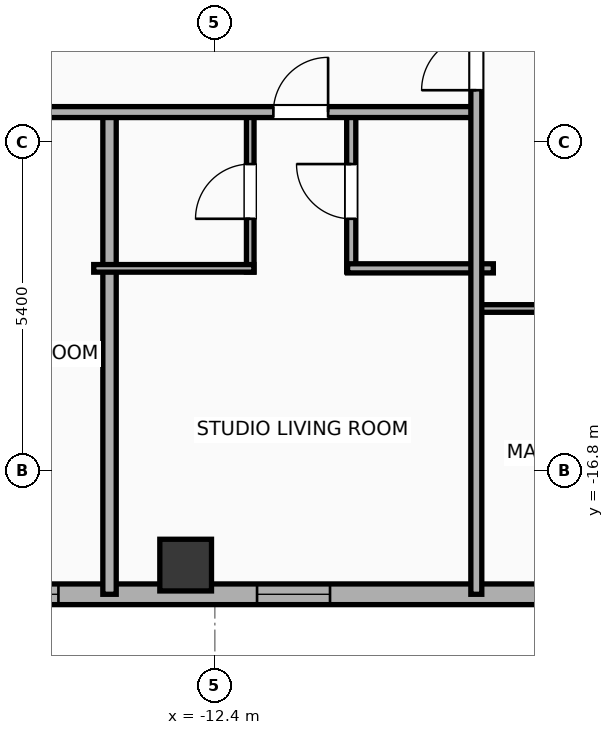
"""IFC4 building model, lengths in metres.
Left out: names, types, materials, properties, quantities, classifications, styles, units other than length and angle.
Written with IfcOpenShell. Run it as: python <this file> out.ifc"""

import sys

from ifc_helpers import new_model, si_unit, direction, frame, frame_2d, origin, origin_2d, place, context, subcontext, project, spatial, rectangle, hollow_rectangle, extrude, element, fill, save


model = new_model("IFC4")
c1 = context("Model", 3, precision=1e-05, world=origin(), true_north=direction((0.0, 1.0)))
c2 = subcontext(c1, "Body", "Model", "MODEL_VIEW")
j1 = project(units=[si_unit("LENGTHUNIT", "METRE"), si_unit("PLANEANGLEUNIT", "RADIAN")], contexts=[c1])
p1 = place(None, origin())
s1 = spatial("IfcSite", under=j1, at=p1, CompositionType="ELEMENT")
p2 = place(p1, origin())
s2 = spatial("IfcBuilding", under=s1, at=p2, CompositionType="ELEMENT")
p3 = place(p2, frame((0.0, 0.0, 243.1)))
s3 = spatial("IfcBuildingStorey", under=s2, at=p3, CompositionType="ELEMENT", Elevation=243.1)
p4 = place(p3, frame((-12.88, -18.35, 0.0), z_axis=(0.0, 0.0, 1.0), x_axis=(1.0, 0.0, 0.0)))
e1 = element("IfcColumn", 1, at=p4, inside=s3, PredefinedType="COLUMN", context=c2, shape_type="SweptSolid", body=[
    extrude(hollow_rectangle(XDim=0.85, YDim=0.85, WallThickness=0.028, at=origin_2d()), origin(), (0.0, 0.0, 1.0), 3.9),
])
p5 = place(p3, frame((26.783, -18.83, 0.0), z_axis=(0.0, 0.0, 1.0), x_axis=(-1.0, 0.0, 0.0)))
e2 = element("IfcWall", 2, at=p5, inside=s3, PredefinedType="ELEMENTEDWALL", context=c2, shape_type="SweptSolid", body=[
    extrude(rectangle(XDim=49.566, YDim=0.34, at=frame_2d((24.783, 0.0))), origin(), (0.0, 0.0, 1.0), 3.65),
])
p6 = place(p5, frame((23.583, 0.0, 0.75)))
e3 = element("IfcOpeningElement", 3, at=p6, cuts=e2, PredefinedType="OPENING", context=c2, shape_type="SweptSolid", body=[
    extrude(rectangle(XDim=2.4, YDim=2.1, at=frame_2d((1.2, 1.05))), frame((0.0, 0.18, 0.0), z_axis=(0.0, -1.0, 0.0), x_axis=(1.0, 0.0, 0.0)), (0.0, 0.0, 1.0), 0.36),
])
p7 = place(p5, frame((41.756, 0.0, 0.75)))
e4 = element("IfcOpeningElement", 4, at=p7, cuts=e2, PredefinedType="OPENING", context=c2, shape_type="SweptSolid", body=[
    extrude(rectangle(XDim=2.4, YDim=2.1, at=frame_2d((1.2, 1.05))), frame((0.0, 0.18, 0.0), z_axis=(0.0, -1.0, 0.0), x_axis=(1.0, 0.0, 0.0)), (0.0, 0.0, 1.0), 0.36),
])
p8 = place(p5, frame((47.222, 0.0, 0.75)))
e5 = element("IfcOpeningElement", 5, at=p8, cuts=e2, PredefinedType="OPENING", context=c2, shape_type="SweptSolid", body=[
    extrude(rectangle(XDim=1.2, YDim=2.05, at=frame_2d((0.6, 1.025))), frame((0.0, 0.18, 0.0), z_axis=(0.0, -1.0, 0.0), x_axis=(1.0, 0.0, 0.0)), (0.0, 0.0, 1.0), 0.36),
])
p9 = place(p5, frame((45.263, 0.0, 0.75)))
e6 = element("IfcOpeningElement", 6, at=p9, cuts=e2, PredefinedType="OPENING", context=c2, shape_type="SweptSolid", body=[
    extrude(rectangle(XDim=1.2, YDim=2.05, at=frame_2d((0.6, 1.025))), frame((0.0, 0.18, 0.0), z_axis=(0.0, -1.0, 0.0), x_axis=(1.0, 0.0, 0.0)), (0.0, 0.0, 1.0), 0.36),
])
p10 = place(p5, frame((37.289, 0.0, 0.75)))
e7 = element("IfcOpeningElement", 7, at=p10, cuts=e2, PredefinedType="OPENING", context=c2, shape_type="SweptSolid", body=[
    extrude(rectangle(XDim=1.2, YDim=2.05, at=frame_2d((0.6, 1.025))), frame((0.0, 0.18, 0.0), z_axis=(0.0, -1.0, 0.0), x_axis=(1.0, 0.0, 0.0)), (0.0, 0.0, 1.0), 0.36),
])
p11 = place(p5, frame((16.115, 0.0, 0.75)))
e8 = element("IfcOpeningElement", 8, at=p11, cuts=e2, PredefinedType="OPENING", context=c2, shape_type="SweptSolid", body=[
    extrude(rectangle(XDim=1.2, YDim=2.05, at=frame_2d((0.6, 1.025))), frame((0.0, 0.18, 0.0), z_axis=(0.0, -1.0, 0.0), x_axis=(1.0, 0.0, 0.0)), (0.0, 0.0, 1.0), 0.36),
])
p12 = place(p5, frame((12.422, 0.0, 0.75)))
e9 = element("IfcOpeningElement", 9, at=p12, cuts=e2, PredefinedType="OPENING", context=c2, shape_type="SweptSolid", body=[
    extrude(rectangle(XDim=1.2, YDim=2.05, at=frame_2d((0.6, 1.025))), frame((0.0, 0.18, 0.0), z_axis=(0.0, -1.0, 0.0), x_axis=(1.0, 0.0, 0.0)), (0.0, 0.0, 1.0), 0.36),
])
p13 = place(p5, frame((8.01, 0.0, 0.75)))
e10 = element("IfcOpeningElement", 10, at=p13, cuts=e2, PredefinedType="OPENING", context=c2, shape_type="SweptSolid", body=[
    extrude(rectangle(XDim=1.2, YDim=2.05, at=frame_2d((0.6, 1.025))), frame((0.0, 0.18, 0.0), z_axis=(0.0, -1.0, 0.0), x_axis=(1.0, 0.0, 0.0)), (0.0, 0.0, 1.0), 0.36),
])
p14 = place(p5, frame((5.037, 0.0, 0.75)))
e11 = element("IfcOpeningElement", 11, at=p14, cuts=e2, PredefinedType="OPENING", context=c2, shape_type="SweptSolid", body=[
    extrude(rectangle(XDim=1.2, YDim=2.05, at=frame_2d((0.6, 1.025))), frame((0.0, 0.18, 0.0), z_axis=(0.0, -1.0, 0.0), x_axis=(1.0, 0.0, 0.0)), (0.0, 0.0, 1.0), 0.36),
])
p15 = place(p5, frame((1.811, 0.0, 0.75)))
e12 = element("IfcOpeningElement", 12, at=p15, cuts=e2, PredefinedType="OPENING", context=c2, shape_type="SweptSolid", body=[
    extrude(rectangle(XDim=1.2, YDim=2.05, at=frame_2d((0.6, 1.025))), frame((0.0, 0.18, 0.0), z_axis=(0.0, -1.0, 0.0), x_axis=(1.0, 0.0, 0.0)), (0.0, 0.0, 1.0), 0.36),
])
p16 = place(p5, frame((32.253, 0.0, 0.75)))
e13 = element("IfcOpeningElement", 13, at=p16, cuts=e2, PredefinedType="OPENING", context=c2, shape_type="SweptSolid", body=[
    extrude(rectangle(XDim=1.2, YDim=2.05, at=frame_2d((0.6, 1.025))), frame((0.0, 0.18, 0.0), z_axis=(0.0, -1.0, 0.0), x_axis=(1.0, 0.0, 0.0)), (0.0, 0.0, 1.0), 0.36),
])
p17 = place(p5, frame((27.853, 0.0, 0.75)))
e14 = element("IfcOpeningElement", 14, at=p17, cuts=e2, PredefinedType="OPENING", context=c2, shape_type="SweptSolid", body=[
    extrude(rectangle(XDim=1.2, YDim=2.05, at=frame_2d((0.6, 1.025))), frame((0.0, 0.18, 0.0), z_axis=(0.0, -1.0, 0.0), x_axis=(1.0, 0.0, 0.0)), (0.0, 0.0, 1.0), 0.36),
])
p18 = place(p5, frame((20.473, 0.0, 0.75)))
e15 = element("IfcOpeningElement", 15, at=p18, cuts=e2, PredefinedType="OPENING", context=c2, shape_type="SweptSolid", body=[
    extrude(rectangle(XDim=1.2, YDim=2.05, at=frame_2d((0.6, 1.025))), frame((0.0, 0.18, 0.0), z_axis=(0.0, -1.0, 0.0), x_axis=(1.0, 0.0, 0.0)), (0.0, 0.0, 1.0), 0.36),
])
p19 = place(p3, frame((-14.132, -18.83, 0.0), z_axis=(0.0, 0.0, 1.0), x_axis=(0.0, 1.0, 0.0)))
e16 = element("IfcWall", 16, at=p19, inside=s3, PredefinedType="PARTITIONING", context=c2, shape_type="SweptSolid", body=[
    extrude(rectangle(XDim=8.01, YDim=0.22, at=frame_2d((4.005, 0.0))), origin(), (0.0, 0.0, 1.0), 3.65),
])
p20 = place(p3, frame((-11.818, -13.53, 0.0), z_axis=(0.0, 0.0, 1.0), x_axis=(0.0, 1.0, 0.0)))
e17 = element("IfcWall", 17, at=p20, inside=s3, PredefinedType="PARTITIONING", context=c2, shape_type="SweptSolid", body=[
    extrude(rectangle(XDim=2.65, YDim=0.125, at=frame_2d((1.325, 0.0))), origin(), (0.0, 0.0, 1.0), 3.65),
])
p21 = place(p20, frame((0.875, 0.0, 0.0)))
e18 = element("IfcOpeningElement", 18, at=p21, cuts=e17, PredefinedType="OPENING", context=c2, shape_type="SweptSolid", body=[
    extrude(rectangle(XDim=0.9, YDim=2.05, at=frame_2d((0.45, 1.025))), frame((0.0, 0.073, 0.0), z_axis=(0.0, -1.0, 0.0), x_axis=(1.0, 0.0, 0.0)), (0.0, 0.0, 1.0), 0.145),
])
p22 = place(p3, frame((-10.157, -13.53, 0.0), z_axis=(0.0, 0.0, 1.0), x_axis=(0.0, 1.0, 0.0)))
e19 = element("IfcWall", 19, at=p22, inside=s3, PredefinedType="PLUMBINGWALL", context=c2, shape_type="SweptSolid", body=[
    extrude(rectangle(XDim=2.65, YDim=0.15, at=frame_2d((1.325, 0.0))), origin(), (0.0, 0.0, 1.0), 3.65),
])
p23 = place(p22, frame((0.875, 0.0, 0.0)))
e20 = element("IfcOpeningElement", 20, at=p23, cuts=e19, PredefinedType="OPENING", context=c2, shape_type="SweptSolid", body=[
    extrude(rectangle(XDim=0.9, YDim=2.05, at=frame_2d((0.45, 1.025))), frame((0.0, 0.085, 0.0), z_axis=(0.0, -1.0, 0.0), x_axis=(1.0, 0.0, 0.0)), (0.0, 0.0, 1.0), 0.17),
])
p24 = place(p3, frame((-14.392, -13.47, 0.0), z_axis=(0.0, 0.0, 1.0), x_axis=(1.0, 0.0, 0.0)))
e21 = element("IfcWall", 21, at=p24, inside=s3, PredefinedType="PARTITIONING", context=c2, shape_type="SweptSolid", body=[
    extrude(rectangle(XDim=2.634, YDim=0.125, at=frame_2d((1.317, 0.0))), origin(), (0.0, 0.0, 1.0), 3.65),
])
p25 = place(p3, frame((-10.217, -13.47, 0.0), z_axis=(0.0, 0.0, 1.0), x_axis=(1.0, 0.0, 0.0)))
e22 = element("IfcWall", 22, at=p25, inside=s3, PredefinedType="PLUMBINGWALL", context=c2, shape_type="SweptSolid", body=[
    extrude(rectangle(XDim=2.397, YDim=0.15, at=frame_2d((1.198, 0.0))), origin(), (0.0, 0.0, 1.0), 3.65),
])
p26 = place(p3, frame((-26.23, -10.9, 0.0), z_axis=(0.0, 0.0, 1.0), x_axis=(1.0, 0.0, 0.0)))
e23 = element("IfcWall", 23, at=p26, inside=s3, PredefinedType="PARTITIONING", context=c2, shape_type="SweptSolid", body=[
    extrude(rectangle(XDim=18.15, YDim=0.18, at=frame_2d((9.075, 0.0))), origin(), (0.0, 0.0, 1.0), 3.65),
])
p27 = place(p26, frame((2.659, 0.0, 0.0)))
e24 = element("IfcOpeningElement", 24, at=p27, cuts=e23, PredefinedType="OPENING", context=c2, shape_type="SweptSolid", body=[
    extrude(rectangle(XDim=0.9, YDim=2.05, at=frame_2d((0.45, 1.025))), frame((0.0, 0.1, 0.0), z_axis=(0.0, -1.0, 0.0), x_axis=(1.0, 0.0, 0.0)), (0.0, 0.0, 1.0), 0.2),
])
p28 = place(p26, frame((9.571, 0.0, 0.0)))
e25 = element("IfcOpeningElement", 25, at=p28, cuts=e23, PredefinedType="OPENING", context=c2, shape_type="SweptSolid", body=[
    extrude(rectangle(XDim=1.15, YDim=2.05, at=frame_2d((0.575, 1.025))), frame((0.0, 0.1, 0.0), z_axis=(0.0, -1.0, 0.0), x_axis=(1.0, 0.0, 0.0)), (0.0, 0.0, 1.0), 0.2),
])
p29 = place(p26, frame((14.792, 0.0, 0.0)))
e26 = element("IfcOpeningElement", 26, at=p29, cuts=e23, PredefinedType="OPENING", context=c2, shape_type="SweptSolid", body=[
    extrude(rectangle(XDim=0.9, YDim=2.05, at=frame_2d((0.45, 1.025))), frame((0.0, 0.1, 0.0), z_axis=(0.0, -1.0, 0.0), x_axis=(1.0, 0.0, 0.0)), (0.0, 0.0, 1.0), 0.2),
])
p30 = place(p3, frame((-8.08, -14.13, 0.0), z_axis=(0.0, 0.0, 1.0), x_axis=(1.0, 0.0, 0.0)))
e27 = element("IfcWall", 27, at=p30, inside=s3, PredefinedType="PARTITIONING", context=c2, shape_type="SweptSolid", body=[
    extrude(rectangle(XDim=8.06, YDim=0.125, at=frame_2d((4.03, 0.0))), origin(), (0.0, 0.0, 1.0), 3.65),
])
p31 = place(p30, frame((1.323, 0.0, 0.0)))
e28 = element("IfcOpeningElement", 28, at=p31, cuts=e27, PredefinedType="OPENING", context=c2, shape_type="SweptSolid", body=[
    extrude(rectangle(XDim=0.9, YDim=2.05, at=frame_2d((0.45, 1.025))), frame((0.0, 0.073, 0.0), z_axis=(0.0, -1.0, 0.0), x_axis=(1.0, 0.0, 0.0)), (0.0, 0.0, 1.0), 0.145),
])
p32 = place(p30, frame((4.547, 0.0, 0.0)))
e29 = element("IfcOpeningElement", 29, at=p32, cuts=e27, PredefinedType="OPENING", context=c2, shape_type="SweptSolid", body=[
    extrude(rectangle(XDim=0.9, YDim=2.05, at=frame_2d((0.45, 1.025))), frame((0.0, 0.073, 0.0), z_axis=(0.0, -1.0, 0.0), x_axis=(1.0, 0.0, 0.0)), (0.0, 0.0, 1.0), 0.145),
])
p33 = place(p3, frame((-8.1, -18.83, 0.0), z_axis=(0.0, 0.0, 1.0), x_axis=(0.0, 1.0, 0.0)))
e30 = element("IfcWall", 30, at=p33, inside=s3, PredefinedType="PARTITIONING", context=c2, shape_type="SweptSolid", body=[
    extrude(rectangle(XDim=9.54, YDim=0.18, at=frame_2d((4.77, 0.0))), origin(), (0.0, 0.0, 1.0), 3.65),
])
p34 = place(p33, frame((8.29, 0.0, 0.0)))
e31 = element("IfcOpeningElement", 31, at=p34, cuts=e30, PredefinedType="OPENING", context=c2, shape_type="SweptSolid", body=[
    extrude(rectangle(XDim=0.9, YDim=2.05, at=frame_2d((0.45, 1.025))), frame((0.0, 0.1, 0.0), z_axis=(0.0, -1.0, 0.0), x_axis=(1.0, 0.0, 0.0)), (0.0, 0.0, 1.0), 0.2),
])
p35 = place(p7, origin())
e32 = element("IfcWindow", 32, at=p35, inside=s3, PartitioningType="SINGLE_PANEL", PredefinedType="WINDOW", context=c2, shape_type="SweptSolid", body=[
    extrude(rectangle(XDim=2.4, YDim=2.1, at=frame_2d((1.2, 1.05))), frame((0.0, 0.03, 0.0), z_axis=(0.0, -1.0, 0.0), x_axis=(1.0, 0.0, 0.0)), (0.0, 0.0, 1.0), 0.06),
])
fill(e4, e32)
p36 = place(p10, origin())
e33 = element("IfcWindow", 33, at=p36, inside=s3, PartitioningType="SINGLE_PANEL", PredefinedType="WINDOW", context=c2, shape_type="SweptSolid", body=[
    extrude(rectangle(XDim=1.2, YDim=2.05, at=frame_2d((0.6, 1.025))), frame((0.0, 0.03, 0.0), z_axis=(0.0, -1.0, 0.0), x_axis=(1.0, 0.0, 0.0)), (0.0, 0.0, 1.0), 0.06),
])
fill(e7, e33)
p37 = place(p21, origin())
e34 = element("IfcDoor", 34, at=p37, inside=s3, OperationType="SINGLE_SWING_LEFT", PredefinedType="DOOR", context=c2, shape_type="SweptSolid", body=[
    extrude(rectangle(XDim=0.9, YDim=2.05, at=frame_2d((0.45, 1.025))), frame((0.0, 0.025, 0.0), z_axis=(0.0, -1.0, 0.0), x_axis=(1.0, 0.0, 0.0)), (0.0, 0.0, 1.0), 0.05),
])
fill(e18, e34)
p38 = place(p23, origin())
e35 = element("IfcDoor", 35, at=p38, inside=s3, OperationType="SINGLE_SWING_RIGHT", PredefinedType="DOOR", context=c2, shape_type="SweptSolid", body=[
    extrude(rectangle(XDim=0.9, YDim=2.05, at=frame_2d((0.45, 1.025))), frame((0.0, 0.025, 0.0), z_axis=(0.0, -1.0, 0.0), x_axis=(1.0, 0.0, 0.0)), (0.0, 0.0, 1.0), 0.05),
])
fill(e20, e35)
p39 = place(p29, origin())
e36 = element("IfcDoor", 36, at=p39, inside=s3, OperationType="SINGLE_SWING_RIGHT", PredefinedType="DOOR", context=c2, shape_type="SweptSolid", body=[
    extrude(rectangle(XDim=0.9, YDim=2.05, at=frame_2d((0.45, 1.025))), frame((0.0, 0.025, 0.0), z_axis=(0.0, -1.0, 0.0), x_axis=(1.0, 0.0, 0.0)), (0.0, 0.0, 1.0), 0.05),
])
fill(e26, e36)
p40 = place(p34, origin())
e37 = element("IfcDoor", 37, at=p40, inside=s3, OperationType="SINGLE_SWING_LEFT", PredefinedType="DOOR", context=c2, shape_type="SweptSolid", body=[
    extrude(rectangle(XDim=0.9, YDim=2.05, at=frame_2d((0.45, 1.025))), frame((0.0, 0.025, 0.0), z_axis=(0.0, -1.0, 0.0), x_axis=(1.0, 0.0, 0.0)), (0.0, 0.0, 1.0), 0.05),
])
fill(e31, e37)
save(model, sys.argv[1])
